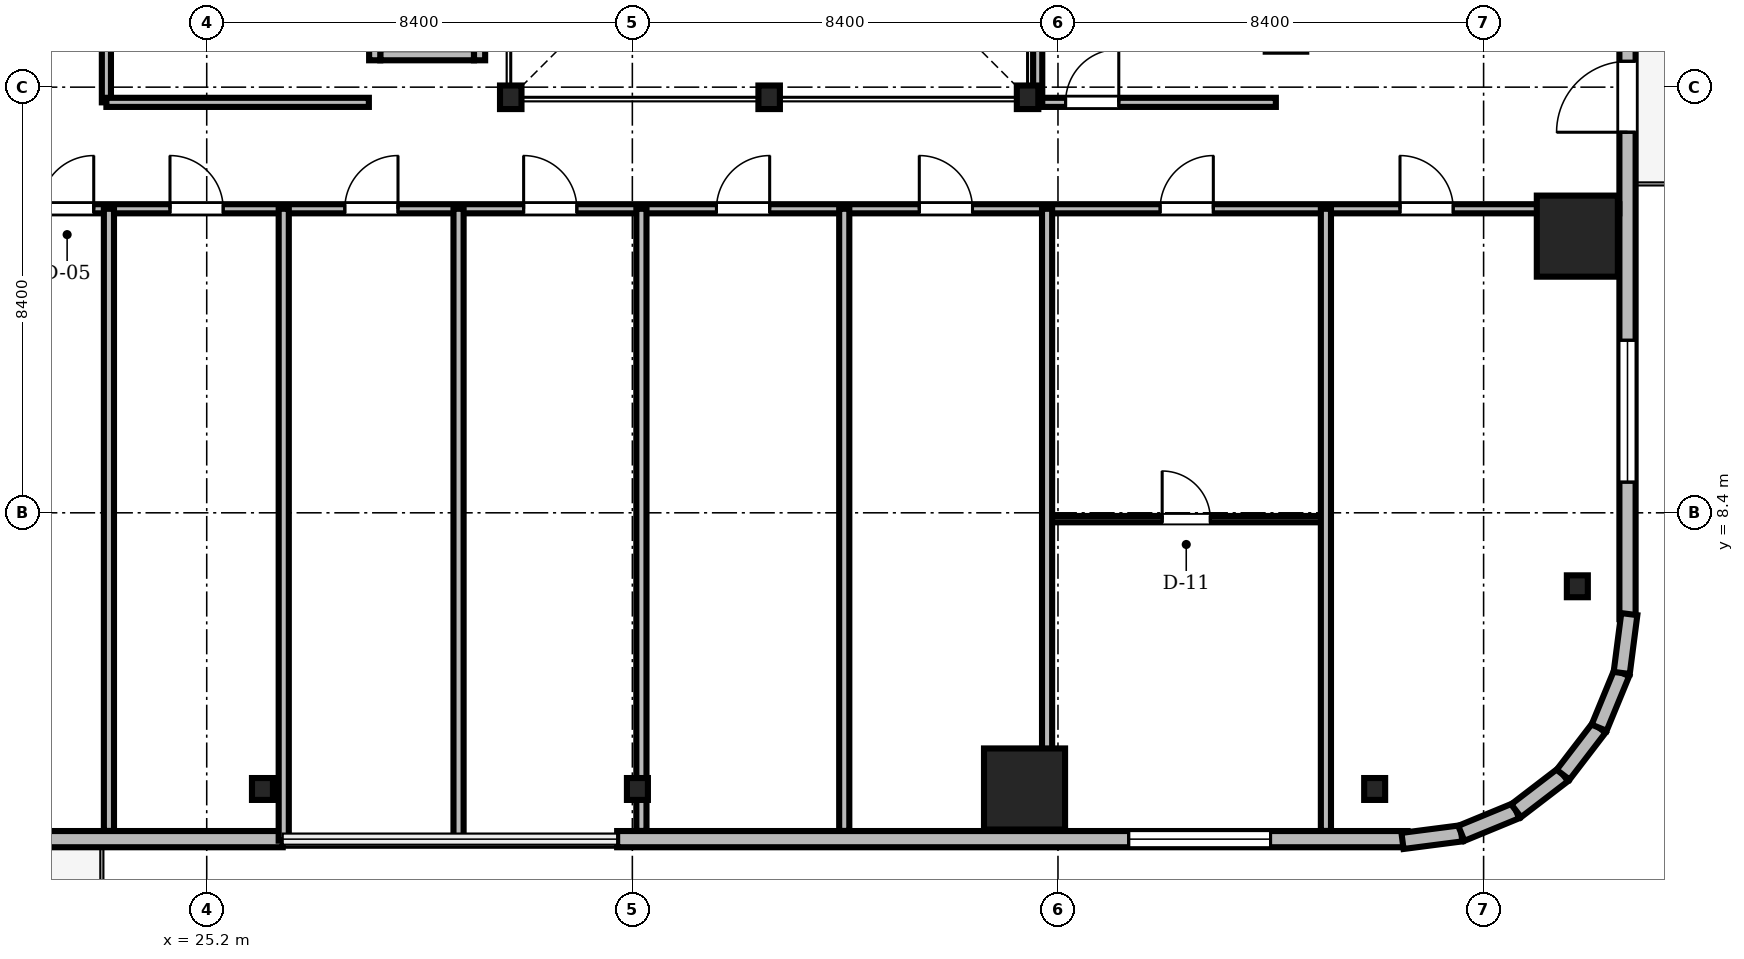
"""IFC4 building model, lengths in metres.
Left out: names, types, materials, properties, quantities, classifications, styles, units other than length and angle.
Written with IfcOpenShell. Run it as: python <this file> out.ifc"""

import sys

from ifc_helpers import new_model, si_unit, direction, frame, frame_2d, origin, origin_2d, place, context, subcontext, project, spatial, rectangle, i_section, extrude, source, transform, mapped, element, fill, save


model = new_model("IFC4")
c1 = context("Model", 3, precision=1e-05, world=origin(), true_north=direction((0.0, 1.0)))
c2 = subcontext(c1, "Body", "Model", "MODEL_VIEW")
j1 = project(units=[si_unit("LENGTHUNIT", "METRE"), si_unit("PLANEANGLEUNIT", "RADIAN")], contexts=[c1])
p1 = place(None, origin())
s1 = spatial("IfcSite", under=j1, at=p1, CompositionType="ELEMENT")
p2 = place(p1, origin())
s2 = spatial("IfcBuilding", under=s1, at=p2, CompositionType="ELEMENT")
p3 = place(p2, frame((0.0, 0.0, 140.9)))
s3 = spatial("IfcBuildingStorey", under=s2, at=p3, CompositionType="ELEMENT", Elevation=140.9)
m1 = source(origin(), c2, "Body", "SweptSolid", [
    extrude(i_section(OverallWidth=0.424, OverallDepth=0.465, WebThickness=0.035, FlangeThickness=0.056, FilletRadius=0.015, at=origin_2d()), origin(), (0.0, 0.0, 1.0), 3.46),
])
for number, where, z_axis, x_axis in (
    (1, (31.2, 16.6, 0.0), (0.0, 0.0, 1.0), (1.0, 0.0, 0.0)),
    (2, (36.3, 16.6, 0.0), (0.0, 0.0, 1.0), (1.0, 0.0, 0.0)),
    (3, (41.4, 16.6, 0.0), (0.0, 0.0, 1.0), (1.0, 0.0, 0.0)),
):
    element("IfcColumn", number, at=place(p3, frame(where, z_axis=z_axis, x_axis=x_axis)), inside=s3, PredefinedType="COLUMN", context=c2, shape_type="MappedRepresentation", body=[
        mapped(m1, transform((0.0, 0.0, 0.0), scale=1.0)),
    ])
m2 = source(origin(), c2, "Body", "SweptSolid", [
    extrude(rectangle(XDim=1.6, YDim=1.6, at=origin_2d()), origin(), (0.0, 0.0, 1.0), 3.46),
])
for number, where, z_axis, x_axis in (
    (4, (41.34, 2.95, 0.0), (0.0, 0.0, 1.0), (1.0, 0.0, 0.0)),
    (5, (52.25, 13.86, 0.0), (0.0, 0.0, 1.0), (1.0, 0.0, 0.0)),
):
    element("IfcColumn", number, at=place(p3, frame(where, z_axis=z_axis, x_axis=x_axis)), inside=s3, PredefinedType="COLUMN", context=c2, shape_type="MappedRepresentation", body=[
        mapped(m2, transform((0.0, 0.0, 0.0), scale=1.0)),
    ])
m3 = source(origin(), c2, "Body", "SweptSolid", [
    extrude(i_section(OverallWidth=0.414, OverallDepth=0.432, WebThickness=0.026, FlangeThickness=0.04, FilletRadius=0.015, at=origin_2d()), origin(), (0.0, 0.0, 1.0), 3.46),
])
for number, where, z_axis, x_axis in (
    (6, (26.3, 2.95, 0.0), (0.0, 0.0, 1.0), (1.0, 0.0, 0.0)),
    (7, (33.7, 2.95, 0.0), (0.0, 0.0, 1.0), (1.0, 0.0, 0.0)),
    (8, (48.25, 2.95, 0.0), (0.0, 0.0, 1.0), (1.0, 0.0, 0.0)),
    (9, (52.25, 6.95, 0.0), (0.0, 0.0, 1.0), (1.0, 0.0, 0.0)),
):
    element("IfcColumn", number, at=place(p3, frame(where, z_axis=z_axis, x_axis=x_axis)), inside=s3, PredefinedType="COLUMN", context=c2, shape_type="MappedRepresentation", body=[
        mapped(m3, transform((0.0, 0.0, 0.0), scale=1.0)),
    ])
m4 = source(origin(), c2, "Body", "SweptSolid", [
    extrude(rectangle(XDim=15.6, YDim=0.32, at=frame_2d((7.8, 0.0))), origin(), (0.0, 0.0, 1.0), 3.46),
])
p4 = place(p3, frame((11.1, 1.96, 0.0), z_axis=(0.0, 0.0, 1.0), x_axis=(1.0, 0.0, 0.0)))
e10 = element("IfcWall", 10, at=p4, inside=s3, PredefinedType="SOLIDWALL", context=c2, shape_type="MappedRepresentation", body=[
    mapped(m4, transform((0.0, 0.0, 0.0), scale=1.0)),
])
m5 = source(origin(), c2, "Body", "SweptSolid", [
    extrude(rectangle(XDim=1.4, YDim=2.3, at=frame_2d((0.7, 1.15))), frame((0.0, 0.17, 0.0), z_axis=(0.0, -1.0, 0.0), x_axis=(1.0, 0.0, 0.0)), (0.0, 0.0, 1.0), 0.34),
])
p5 = place(p4, frame((9.61, 0.0, 0.0)))
e11 = element("IfcOpeningElement", 11, at=p5, cuts=e10, PredefinedType="OPENING", context=c2, shape_type="MappedRepresentation", body=[
    mapped(m5, transform((0.0, 0.0, 0.0), scale=1.0)),
])
m6 = source(origin(), c2, "Body", "SweptSolid", [
    extrude(rectangle(XDim=2.8, YDim=2.4, at=frame_2d((1.4, 1.2))), frame((0.0, 0.17, 0.0), z_axis=(0.0, -1.0, 0.0), x_axis=(1.0, 0.0, 0.0)), (0.0, 0.0, 1.0), 0.34),
])
p6 = place(p4, frame((2.705, 0.0, 0.72)))
e12 = element("IfcOpeningElement", 12, at=p6, cuts=e10, PredefinedType="OPENING", context=c2, shape_type="MappedRepresentation", body=[
    mapped(m6, transform((0.0, 0.0, 0.0), scale=1.0)),
])
p7 = place(p3, frame((33.3, 1.96, 0.0), z_axis=(0.0, 0.0, 1.0), x_axis=(1.0, 0.0, 0.0)))
e13 = element("IfcWall", 13, at=p7, inside=s3, PredefinedType="SOLIDWALL", context=c2, shape_type="MappedRepresentation", body=[
    mapped(m4, transform((0.0, 0.0, 0.0), scale=1.0)),
])
p8 = place(p7, frame((10.095, 0.0, 0.72)))
e14 = element("IfcOpeningElement", 14, at=p8, cuts=e13, PredefinedType="OPENING", context=c2, shape_type="MappedRepresentation", body=[
    mapped(m6, transform((0.0, 0.0, 0.0), scale=1.0)),
])
p9 = place(p3, frame((53.24, 6.3, 0.0), z_axis=(0.0, 0.0, 1.0), x_axis=(0.0, 1.0, 0.0)))
e15 = element("IfcWall", 15, at=p9, inside=s3, PredefinedType="SOLIDWALL", context=c2, shape_type="MappedRepresentation", body=[
    mapped(m4, transform((0.0, 0.0, 0.0), scale=1.0)),
])
p10 = place(p9, frame((9.61, 0.0, 0.0)))
e16 = element("IfcOpeningElement", 16, at=p10, cuts=e15, PredefinedType="OPENING", context=c2, shape_type="MappedRepresentation", body=[
    mapped(m5, transform((0.0, 0.0, 0.0), scale=1.0)),
])
p11 = place(p9, frame((2.705, 0.0, 0.72)))
e17 = element("IfcOpeningElement", 17, at=p11, cuts=e15, PredefinedType="OPENING", context=c2, shape_type="MappedRepresentation", body=[
    mapped(m6, transform((0.0, 0.0, 0.0), scale=1.0)),
])
m7 = source(origin(), c2, "Body", "SweptSolid", [
    extrude(rectangle(XDim=1.17, YDim=0.32, at=frame_2d((0.585, 0.0))), origin(), (0.0, 0.0, 1.0), 3.46),
])
p12 = place(p3, frame((48.8, 1.925, 0.0), z_axis=(0.0, 0.0, 1.0), x_axis=(0.991762485493, 0.128090485085, 0.0)))
e18 = element("IfcWall", 18, at=p12, inside=s3, PredefinedType="SOLIDWALL", context=c2, shape_type="MappedRepresentation", body=[
    mapped(m7, transform((0.0, 0.0, 0.0), scale=1.0)),
])
m8 = source(origin(), c2, "Body", "SweptSolid", [
    extrude(rectangle(XDim=1.169, YDim=0.32, at=frame_2d((0.585, 0.0))), origin(), (0.0, 0.0, 1.0), 3.46),
])
p13 = place(p3, frame((49.96, 2.074, 0.0), z_axis=(0.0, 0.0, 1.0), x_axis=(0.924479075121, 0.381232789334, 0.0)))
e19 = element("IfcWall", 19, at=p13, inside=s3, PredefinedType="SOLIDWALL", context=c2, shape_type="MappedRepresentation", body=[
    mapped(m8, transform((0.0, 0.0, 0.0), scale=1.0)),
])
m9 = source(origin(), c2, "Body", "SweptSolid", [
    extrude(rectangle(XDim=1.169, YDim=0.32, at=frame_2d((0.584, 0.0))), origin(), (0.0, 0.0, 1.0), 3.46),
])
p14 = place(p3, frame((51.041, 2.52, 0.0), z_axis=(0.0, 0.0, 1.0), x_axis=(0.793663520347, 0.608356981114, 0.0)))
e20 = element("IfcWall", 20, at=p14, inside=s3, PredefinedType="SOLIDWALL", context=c2, shape_type="MappedRepresentation", body=[
    mapped(m9, transform((0.0, 0.0, 0.0), scale=1.0)),
])
m10 = source(origin(), c2, "Body", "SweptSolid", [
    extrude(rectangle(XDim=1.169, YDim=0.32, at=frame_2d((0.584, 0.0))), origin(), (0.0, 0.0, 1.0), 3.46),
])
for number, where, z_axis, x_axis in (
    (21, (51.969, 3.231, 0.0), (0.0, 0.0, 1.0), (0.608, 0.794, 0.0)),
    (22, (52.68, 4.159, 0.0), (0.0, 0.0, 1.0), (0.381, 0.925, 0.0)),
):
    element("IfcWall", number, at=place(p3, frame(where, z_axis=z_axis, x_axis=x_axis)), inside=s3, PredefinedType="SOLIDWALL", context=c2, shape_type="MappedRepresentation", body=[
        mapped(m10, transform((0.0, 0.0, 0.0), scale=1.0)),
    ])
m11 = source(origin(), c2, "Body", "SweptSolid", [
    extrude(rectangle(XDim=1.171, YDim=0.32, at=frame_2d((0.585, 0.0))), origin(), (0.0, 0.0, 1.0), 3.46),
])
p15 = place(p3, frame((53.125, 5.24, 0.0), z_axis=(0.0, 0.0, 1.0), x_axis=(0.128269133229, 0.991739395941, 0.0)))
e23 = element("IfcWall", 23, at=p15, inside=s3, PredefinedType="SOLIDWALL", context=c2, shape_type="MappedRepresentation", body=[
    mapped(m11, transform((0.0, 0.0, 0.0), scale=1.0)),
])
m12 = source(origin(), c2, "Body", "SweptSolid", [
    extrude(rectangle(XDim=1.85, YDim=0.22, at=frame_2d((0.925, 0.0))), origin(), (0.0, 0.0, 1.0), 3.46),
])
p16 = place(p3, frame((28.625, 17.44, 0.0), z_axis=(0.0, 0.0, 1.0), x_axis=(1.0, 0.0, 0.0)))
e24 = element("IfcWall", 24, at=p16, inside=s3, PredefinedType="SOLIDWALL", context=c2, shape_type="MappedRepresentation", body=[
    mapped(m12, transform((0.0, 0.0, 0.0), scale=1.0)),
])
m13 = source(origin(), c2, "Body", "SweptSolid", [
    extrude(rectangle(XDim=2.54, YDim=0.22, at=frame_2d((1.27, 0.0))), origin(), (0.0, 0.0, 1.0), 3.46),
])
for number, where, z_axis, x_axis in (
    (25, (28.515, 17.33, 0.0), (0.0, 0.0, 1.0), (0.0, 1.0, 0.0)),
    (26, (30.585, 17.33, 0.0), (0.0, 0.0, 1.0), (0.0, 1.0, 0.0)),
):
    element("IfcWall", number, at=place(p3, frame(where, z_axis=z_axis, x_axis=x_axis)), inside=s3, PredefinedType="SOLIDWALL", context=c2, shape_type="MappedRepresentation", body=[
        mapped(m13, transform((0.0, 0.0, 0.0), scale=1.0)),
    ])
m14 = source(origin(), c2, "Body", "SweptSolid", [
    extrude(rectangle(XDim=46.156, YDim=0.18, at=frame_2d((23.078, 0.0))), origin(), (0.0, 0.0, 1.0), 2.702),
])
p17 = place(p3, frame((6.922, 14.4, 0.0), z_axis=(0.0, 0.0, 1.0), x_axis=(1.0, 0.0, 0.0)))
e27 = element("IfcWall", 27, at=p17, inside=s3, PredefinedType="PARTITIONING", context=c2, shape_type="MappedRepresentation", body=[
    mapped(m14, transform((0.0, 0.0, 0.0), scale=1.0)),
])
m15 = source(origin(), c2, "Body", "SweptSolid", [
    extrude(rectangle(XDim=1.05, YDim=2.2, at=frame_2d((0.525, 1.1))), frame((0.0, 0.1, 0.0), z_axis=(0.0, -1.0, 0.0), x_axis=(1.0, 0.0, 0.0)), (0.0, 0.0, 1.0), 0.2),
])
p18 = place(p17, frame((14.998, 0.0, 0.0)))
e28 = element("IfcOpeningElement", 28, at=p18, cuts=e27, PredefinedType="OPENING", context=c2, shape_type="MappedRepresentation", body=[
    mapped(m15, transform((0.0, 0.0, 0.0), scale=1.0)),
])
p19 = place(p17, frame((17.553, 0.0, 0.0)))
e29 = element("IfcOpeningElement", 29, at=p19, cuts=e27, PredefinedType="OPENING", context=c2, shape_type="MappedRepresentation", body=[
    mapped(m15, transform((0.0, 0.0, 0.0), scale=1.0)),
])
p20 = place(p17, frame((21.003, 0.0, 0.0)))
e30 = element("IfcOpeningElement", 30, at=p20, cuts=e27, PredefinedType="OPENING", context=c2, shape_type="MappedRepresentation", body=[
    mapped(m15, transform((0.0, 0.0, 0.0), scale=1.0)),
])
p21 = place(p17, frame((24.532, 0.0, 0.0)))
e31 = element("IfcOpeningElement", 31, at=p21, cuts=e27, PredefinedType="OPENING", context=c2, shape_type="MappedRepresentation", body=[
    mapped(m15, transform((0.0, 0.0, 0.0), scale=1.0)),
])
p22 = place(p17, frame((28.338, 0.0, 0.0)))
e32 = element("IfcOpeningElement", 32, at=p22, cuts=e27, PredefinedType="OPENING", context=c2, shape_type="MappedRepresentation", body=[
    mapped(m15, transform((0.0, 0.0, 0.0), scale=1.0)),
])
p23 = place(p17, frame((32.341, 0.0, 0.0)))
e33 = element("IfcOpeningElement", 33, at=p23, cuts=e27, PredefinedType="OPENING", context=c2, shape_type="MappedRepresentation", body=[
    mapped(m15, transform((0.0, 0.0, 0.0), scale=1.0)),
])
p24 = place(p17, frame((37.094, 0.0, 0.0)))
e34 = element("IfcOpeningElement", 34, at=p24, cuts=e27, PredefinedType="OPENING", context=c2, shape_type="MappedRepresentation", body=[
    mapped(m15, transform((0.0, 0.0, 0.0), scale=1.0)),
])
p25 = place(p17, frame((41.828, 0.0, 0.0)))
e35 = element("IfcOpeningElement", 35, at=p25, cuts=e27, PredefinedType="OPENING", context=c2, shape_type="MappedRepresentation", body=[
    mapped(m15, transform((0.0, 0.0, 0.0), scale=1.0)),
])
m16 = source(origin(), c2, "Body", "SweptSolid", [
    extrude(rectangle(XDim=11.94, YDim=0.18, at=frame_2d((5.97, 0.0))), origin(), (0.0, 0.0, 1.0), 2.852),
])
p26 = place(p3, frame((23.22, 16.5, 0.0), z_axis=(0.0, 0.0, 1.0), x_axis=(0.0, 1.0, 0.0)))
e36 = element("IfcWall", 36, at=p26, inside=s3, PredefinedType="PARTITIONING", context=c2, shape_type="MappedRepresentation", body=[
    mapped(m16, transform((0.0, 0.0, 0.0), scale=1.0)),
])
p27 = place(p26, frame((4.5, 0.0, 0.0)))
e37 = element("IfcOpeningElement", 37, at=p27, cuts=e36, PredefinedType="OPENING", context=c2, shape_type="MappedRepresentation", body=[
    mapped(m15, transform((0.0, 0.0, 0.0), scale=1.0)),
])
m17 = source(origin(), c2, "Body", "SweptSolid", [
    extrude(rectangle(XDim=5.503, YDim=0.125, at=frame_2d((2.751, 0.0))), origin(), (0.0, 0.0, 1.0), 3.46),
])
p28 = place(p3, frame((41.785, 8.275, 0.0), z_axis=(0.0, 0.0, 1.0), x_axis=(1.0, 0.0, 0.0)))
e38 = element("IfcWall", 38, at=p28, inside=s3, PredefinedType="PARTITIONING", context=c2, shape_type="MappedRepresentation", body=[
    mapped(m17, transform((0.0, 0.0, 0.0), scale=1.0)),
])
m18 = source(origin(), c2, "Body", "SweptSolid", [
    extrude(rectangle(XDim=0.95, YDim=2.15, at=frame_2d((0.475, 1.075))), frame((0.0, 0.073, 0.0), z_axis=(0.0, -1.0, 0.0), x_axis=(1.0, 0.0, 0.0)), (0.0, 0.0, 1.0), 0.145),
])
p29 = place(p28, frame((2.271, 0.0, 0.0)))
e39 = element("IfcOpeningElement", 39, at=p29, cuts=e38, PredefinedType="OPENING", context=c2, shape_type="MappedRepresentation", body=[
    mapped(m18, transform((0.0, 0.0, 0.0), scale=1.0)),
])
m19 = source(origin(), c2, "Body", "SweptSolid", [
    extrude(rectangle(XDim=4.7, YDim=0.18, at=frame_2d((2.35, 0.0))), origin(), (0.0, 0.0, 1.0), 2.852),
])
p30 = place(p3, frame((41.6, 16.5, 0.0), z_axis=(0.0, 0.0, 1.0), x_axis=(1.0, 0.0, 0.0)))
e40 = element("IfcWall", 40, at=p30, inside=s3, PredefinedType="PARTITIONING", context=c2, shape_type="MappedRepresentation", body=[
    mapped(m19, transform((0.0, 0.0, 0.0), scale=1.0)),
])
p31 = place(p30, frame((0.55, 0.0, 0.0)))
e41 = element("IfcOpeningElement", 41, at=p31, cuts=e40, PredefinedType="OPENING", context=c2, shape_type="MappedRepresentation", body=[
    mapped(m15, transform((0.0, 0.0, 0.0), scale=1.0)),
])
m20 = source(origin(), c2, "Body", "SweptSolid", [
    extrude(rectangle(XDim=12.278, YDim=0.2, at=frame_2d((6.139, 0.0))), origin(), (0.0, 0.0, 1.0), 2.702),
])
p32 = place(p3, frame((23.27, 2.122, 0.0), z_axis=(0.0, 0.0, 1.0), x_axis=(0.0, 1.0, 0.0)))
e42 = element("IfcWall", 42, at=p32, inside=s3, PredefinedType="PARTITIONING", context=c2, shape_type="MappedRepresentation", body=[
    mapped(m20, transform((0.0, 0.0, 0.0), scale=1.0)),
])
m21 = source(origin(), c2, "Body", "SweptSolid", [
    extrude(rectangle(XDim=12.47, YDim=0.2, at=frame_2d((6.235, 0.0))), origin(), (0.0, 0.0, 1.0), 2.702),
])
for number, where, z_axis, x_axis in (
    (43, (26.72, 1.93, 0.0), (0.0, 0.0, 1.0), (0.0, 1.0, 0.0)),
    (44, (30.17, 1.93, 0.0), (0.0, 0.0, 1.0), (0.0, 1.0, 0.0)),
):
    element("IfcWall", number, at=place(p3, frame(where, z_axis=z_axis, x_axis=x_axis)), inside=s3, PredefinedType="PARTITIONING", context=c2, shape_type="MappedRepresentation", body=[
        mapped(m21, transform((0.0, 0.0, 0.0), scale=1.0)),
    ])
for number, where, z_axis, x_axis in (
    (45, (33.779, 2.122, 0.0), (0.0, 0.0, 1.0), (0.0, 1.0, 0.0)),
    (46, (37.782, 2.122, 0.0), (0.0, 0.0, 1.0), (0.0, 1.0, 0.0)),
    (47, (41.785, 2.122, 0.0), (0.0, 0.0, 1.0), (0.0, 1.0, 0.0)),
    (48, (47.288, 2.122, 0.0), (0.0, 0.0, 1.0), (0.0, 1.0, 0.0)),
):
    element("IfcWall", number, at=place(p3, frame(where, z_axis=z_axis, x_axis=x_axis)), inside=s3, PredefinedType="PARTITIONING", context=c2, shape_type="MappedRepresentation", body=[
        mapped(m20, transform((0.0, 0.0, 0.0), scale=1.0)),
    ])
m22 = source(origin(), c2, "Body", "SweptSolid", [
    extrude(rectangle(XDim=7.15, YDim=0.18, at=frame_2d((3.575, 0.0))), origin(), (0.0, 0.0, 1.0), 2.852),
])
p33 = place(p3, frame((41.6, 16.5, 0.0), z_axis=(0.0, 0.0, 1.0), x_axis=(0.0, 1.0, 0.0)))
e49 = element("IfcWall", 49, at=p33, inside=s3, PredefinedType="PARTITIONING", context=c2, shape_type="MappedRepresentation", body=[
    mapped(m22, transform((0.0, 0.0, 0.0), scale=1.0)),
])
m23 = source(origin(), c2, "Body", "SweptSolid", [
    extrude(rectangle(XDim=5.18, YDim=0.18, at=frame_2d((2.59, 0.0))), origin(), (0.0, 0.0, 1.0), 3.46),
])
p34 = place(p3, frame((23.22, 16.5, 0.0), z_axis=(0.0, 0.0, 1.0), x_axis=(1.0, 0.0, 0.0)))
e50 = element("IfcWall", 50, at=p34, inside=s3, PredefinedType="PARTITIONING", context=c2, shape_type="MappedRepresentation", body=[
    mapped(m23, transform((0.0, 0.0, 0.0), scale=1.0)),
])
m24 = source(origin(), c2, "Body", "SweptSolid", [
    extrude(rectangle(XDim=2.8, YDim=2.4, at=frame_2d((1.4, 1.2))), frame((0.0, 0.03, 0.0), z_axis=(0.0, -1.0, 0.0), x_axis=(1.0, 0.0, 0.0)), (0.0, 0.0, 1.0), 0.06),
])
p35 = place(p8, origin())
e51 = element("IfcWindow", 51, at=p35, inside=s3, PartitioningType="SINGLE_PANEL", PredefinedType="WINDOW", context=c2, shape_type="MappedRepresentation", body=[
    mapped(m24, transform((0.0, 0.0, 0.0), scale=1.0)),
])
fill(e14, e51)
m25 = source(origin(), c2, "Body", "SweptSolid", [
    extrude(rectangle(XDim=1.4, YDim=2.3, at=frame_2d((0.7, 1.15))), frame((0.0, 0.025, 0.0), z_axis=(0.0, -1.0, 0.0), x_axis=(1.0, 0.0, 0.0)), (0.0, 0.0, 1.0), 0.05),
])
p36 = place(p10, frame((1.4, 0.0, 0.0), z_axis=(0.0, 0.0, 1.0), x_axis=(-1.0, 0.0, 0.0)))
e52 = element("IfcDoor", 52, at=p36, inside=s3, OperationType="DOUBLE_DOOR_SLIDING", PredefinedType="DOOR", context=c2, shape_type="MappedRepresentation", body=[
    mapped(m25, transform((0.0, 0.0, 0.0), scale=1.0)),
])
fill(e16, e52)
p37 = place(p11, origin())
e53 = element("IfcWindow", 53, at=p37, inside=s3, PartitioningType="SINGLE_PANEL", PredefinedType="WINDOW", context=c2, shape_type="MappedRepresentation", body=[
    mapped(m24, transform((0.0, 0.0, 0.0), scale=1.0)),
])
fill(e17, e53)
m26 = source(origin(), c2, "Body", "SweptSolid", [
    extrude(rectangle(XDim=1.05, YDim=2.2, at=frame_2d((0.525, 1.1))), frame((0.0, 0.025, 0.0), z_axis=(0.0, -1.0, 0.0), x_axis=(1.0, 0.0, 0.0)), (0.0, 0.0, 1.0), 0.05),
])
p38 = place(p18, origin())
e54 = element("IfcDoor", 54, at=p38, inside=s3, OperationType="SINGLE_SWING_RIGHT", PredefinedType="DOOR", context=c2, shape_type="MappedRepresentation", body=[
    mapped(m26, transform((0.0, 0.0, 0.0), scale=1.0)),
])
fill(e28, e54)
p39 = place(p19, origin())
e55 = element("IfcDoor", 55, at=p39, inside=s3, OperationType="SINGLE_SWING_LEFT", PredefinedType="DOOR", context=c2, shape_type="MappedRepresentation", body=[
    mapped(m26, transform((0.0, 0.0, 0.0), scale=1.0)),
])
fill(e29, e55)
p40 = place(p20, origin())
e56 = element("IfcDoor", 56, at=p40, inside=s3, OperationType="SINGLE_SWING_RIGHT", PredefinedType="DOOR", context=c2, shape_type="MappedRepresentation", body=[
    mapped(m26, transform((0.0, 0.0, 0.0), scale=1.0)),
])
fill(e30, e56)
p41 = place(p21, origin())
e57 = element("IfcDoor", 57, at=p41, inside=s3, OperationType="SINGLE_SWING_LEFT", PredefinedType="DOOR", context=c2, shape_type="MappedRepresentation", body=[
    mapped(m26, transform((0.0, 0.0, 0.0), scale=1.0)),
])
fill(e31, e57)
p42 = place(p22, origin())
e58 = element("IfcDoor", 58, at=p42, inside=s3, OperationType="SINGLE_SWING_RIGHT", PredefinedType="DOOR", context=c2, shape_type="MappedRepresentation", body=[
    mapped(m26, transform((0.0, 0.0, 0.0), scale=1.0)),
])
fill(e32, e58)
p43 = place(p23, origin())
e59 = element("IfcDoor", 59, at=p43, inside=s3, OperationType="SINGLE_SWING_LEFT", PredefinedType="DOOR", context=c2, shape_type="MappedRepresentation", body=[
    mapped(m26, transform((0.0, 0.0, 0.0), scale=1.0)),
])
fill(e33, e59)
p44 = place(p24, origin())
e60 = element("IfcDoor", 60, at=p44, inside=s3, OperationType="SINGLE_SWING_RIGHT", PredefinedType="DOOR", context=c2, shape_type="MappedRepresentation", body=[
    mapped(m26, transform((0.0, 0.0, 0.0), scale=1.0)),
])
fill(e34, e60)
p45 = place(p25, origin())
e61 = element("IfcDoor", 61, at=p45, inside=s3, OperationType="SINGLE_SWING_LEFT", PredefinedType="DOOR", context=c2, shape_type="MappedRepresentation", body=[
    mapped(m26, transform((0.0, 0.0, 0.0), scale=1.0)),
])
fill(e35, e61)
m27 = source(origin(), c2, "Body", "SweptSolid", [
    extrude(rectangle(XDim=0.95, YDim=2.15, at=frame_2d((0.475, 1.075))), frame((0.0, 0.025, 0.0), z_axis=(0.0, -1.0, 0.0), x_axis=(1.0, 0.0, 0.0)), (0.0, 0.0, 1.0), 0.05),
])
p46 = place(p29, origin())
e62 = element("IfcDoor", 62, at=p46, inside=s3, OperationType="SINGLE_SWING_LEFT", PredefinedType="DOOR", context=c2, shape_type="MappedRepresentation", body=[
    mapped(m27, transform((0.0, 0.0, 0.0), scale=1.0)),
])
fill(e39, e62)
p47 = place(p31, origin())
e63 = element("IfcDoor", 63, at=p47, inside=s3, OperationType="SINGLE_SWING_RIGHT", PredefinedType="DOOR", context=c2, shape_type="MappedRepresentation", body=[
    mapped(m26, transform((0.0, 0.0, 0.0), scale=1.0)),
])
fill(e41, e63)
save(model, sys.argv[1])
